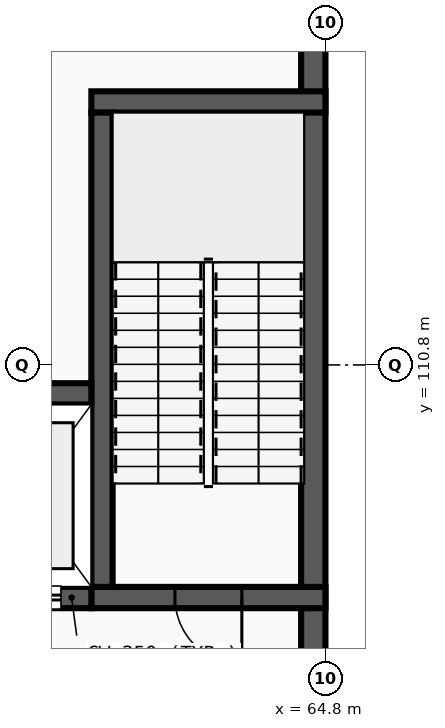
"""IFC4 building model, lengths in metres.
Left out: names, types, materials, properties, quantities, classifications, styles, units other than length and angle.
Written with IfcOpenShell. Run it as: python <this file> out.ifc"""

import sys

from ifc_helpers import new_model, si_unit, direction, frame, frame_2d, origin, place, context, subcontext, project, spatial, rectangle, extrude, element, fill, save


model = new_model("IFC4")
c1 = context("Model", 3, precision=1e-05, world=origin(), true_north=direction((0.0, 1.0)))
c2 = subcontext(c1, "Body", "Model", "MODEL_VIEW")
j1 = project(units=[si_unit("LENGTHUNIT", "METRE"), si_unit("PLANEANGLEUNIT", "RADIAN")], contexts=[c1])
p1 = place(None, origin())
s1 = spatial("IfcSite", under=j1, at=p1, CompositionType="ELEMENT")
p2 = place(p1, origin())
s2 = spatial("IfcBuilding", under=s1, at=p2, CompositionType="ELEMENT")
p3 = place(p2, frame((0.0, 0.0, -4.8)))
s3 = spatial("IfcBuildingStorey", under=s2, at=p3, CompositionType="ELEMENT", Elevation=-4.8)
p4 = place(p3, frame((64.6, 79.2, 0.0), z_axis=(0.0, 0.0, 1.0), x_axis=(0.0, 1.0, 0.0)))
e1 = element("IfcWall", 1, at=p4, inside=s3, PredefinedType="USERDEFINED", context=c2, shape_type="SweptSolid", body=[
    extrude(rectangle(XDim=38.4, YDim=0.4, at=frame_2d((19.2, 0.0))), origin(), (0.0, 0.0, 1.0), 4.545),
])
p5 = place(p3, frame((60.95, 106.975, 0.0), z_axis=(0.0, 0.0, 1.0), x_axis=(1.0, 0.0, 0.0)))
e2 = element("IfcWall", 2, at=p5, inside=s3, PredefinedType="SHEAR", context=c2, shape_type="SweptSolid", body=[
    extrude(rectangle(XDim=3.85, YDim=0.35, at=frame_2d((1.925, 0.0))), origin(), (0.0, 0.0, 1.0), 4.545),
])
p6 = place(p5, frame((1.375, 0.0, 0.0)))
e3 = element("IfcOpeningElement", 3, at=p6, cuts=e2, PredefinedType="OPENING", context=c2, shape_type="SweptSolid", body=[
    extrude(rectangle(XDim=1.1, YDim=2.15, at=frame_2d((0.55, 1.075))), frame((0.0, 0.185, 0.0), z_axis=(0.0, -1.0, 0.0), x_axis=(1.0, 0.0, 0.0)), (0.0, 0.0, 1.0), 0.37),
])
p7 = place(p3, frame((60.95, 115.125, 0.0), z_axis=(0.0, 0.0, 1.0), x_axis=(1.0, 0.0, 0.0)))
e4 = element("IfcWall", 4, at=p7, inside=s3, PredefinedType="SHEAR", context=c2, shape_type="SweptSolid", body=[
    extrude(rectangle(XDim=3.85, YDim=0.35, at=frame_2d((1.925, 0.0))), origin(), (0.0, 0.0, 1.0), 4.545),
])
p8 = place(p3, frame((61.125, 107.15, 0.0), z_axis=(0.0, 0.0, 1.0), x_axis=(0.0, 1.0, 0.0)))
e5 = element("IfcWall", 5, at=p8, inside=s3, PredefinedType="SHEAR", context=c2, shape_type="SweptSolid", body=[
    extrude(rectangle(XDim=7.8, YDim=0.35, at=frame_2d((3.9, 0.0))), origin(), (0.0, 0.0, 1.0), 4.545),
])
p9 = place(p3, frame((58.75, 106.975, 0.0), z_axis=(0.0, 0.0, 1.0), x_axis=(1.0, 0.0, 0.0)))
e6 = element("IfcWall", 6, at=p9, inside=s3, PredefinedType="SHEAR", context=c2, shape_type="SweptSolid", body=[
    extrude(rectangle(XDim=2.2, YDim=0.35, at=frame_2d((1.1, 0.0))), origin(), (0.0, 0.0, 1.0), 4.545),
])
p10 = place(p9, frame((0.5, 0.0, 0.0)))
e7 = element("IfcOpeningElement", 7, at=p10, cuts=e6, PredefinedType="OPENING", context=c2, shape_type="SweptSolid", body=[
    extrude(rectangle(XDim=1.2, YDim=2.2, at=frame_2d((0.6, 1.1))), frame((0.0, 0.185, 0.0), z_axis=(0.0, -1.0, 0.0), x_axis=(1.0, 0.0, 0.0)), (0.0, 0.0, 1.0), 0.37),
])
p11 = place(p3, frame((58.75, 110.325, 0.0), z_axis=(0.0, 0.0, 1.0), x_axis=(1.0, 0.0, 0.0)))
e8 = element("IfcWall", 8, at=p11, inside=s3, PredefinedType="SHEAR", context=c2, shape_type="SweptSolid", body=[
    extrude(rectangle(XDim=2.2, YDim=0.35, at=frame_2d((1.1, 0.0))), origin(), (0.0, 0.0, 1.0), 4.545),
])
p12 = place(p6, origin())
e9 = element("IfcDoor", 9, at=p12, inside=s3, OperationType="SINGLE_SWING_RIGHT", PredefinedType="DOOR", context=c2, shape_type="SweptSolid", body=[
    extrude(rectangle(XDim=1.1, YDim=2.15, at=frame_2d((0.55, 1.075))), frame((0.0, 0.025, 0.0), z_axis=(0.0, -1.0, 0.0), x_axis=(1.0, 0.0, 0.0)), (0.0, 0.0, 1.0), 0.05),
])
fill(e3, e9)
p13 = place(p10, origin())
e10 = element("IfcDoor", 10, at=p13, inside=s3, OperationType="SLIDING_TO_RIGHT", PredefinedType="DOOR", context=c2, shape_type="SweptSolid", body=[
    extrude(rectangle(XDim=1.2, YDim=2.2, at=frame_2d((0.6, 1.1))), frame((0.0, 0.025, 0.0), z_axis=(0.0, -1.0, 0.0), x_axis=(1.0, 0.0, 0.0)), (0.0, 0.0, 1.0), 0.05),
])
fill(e7, e10)
save(model, sys.argv[1])
